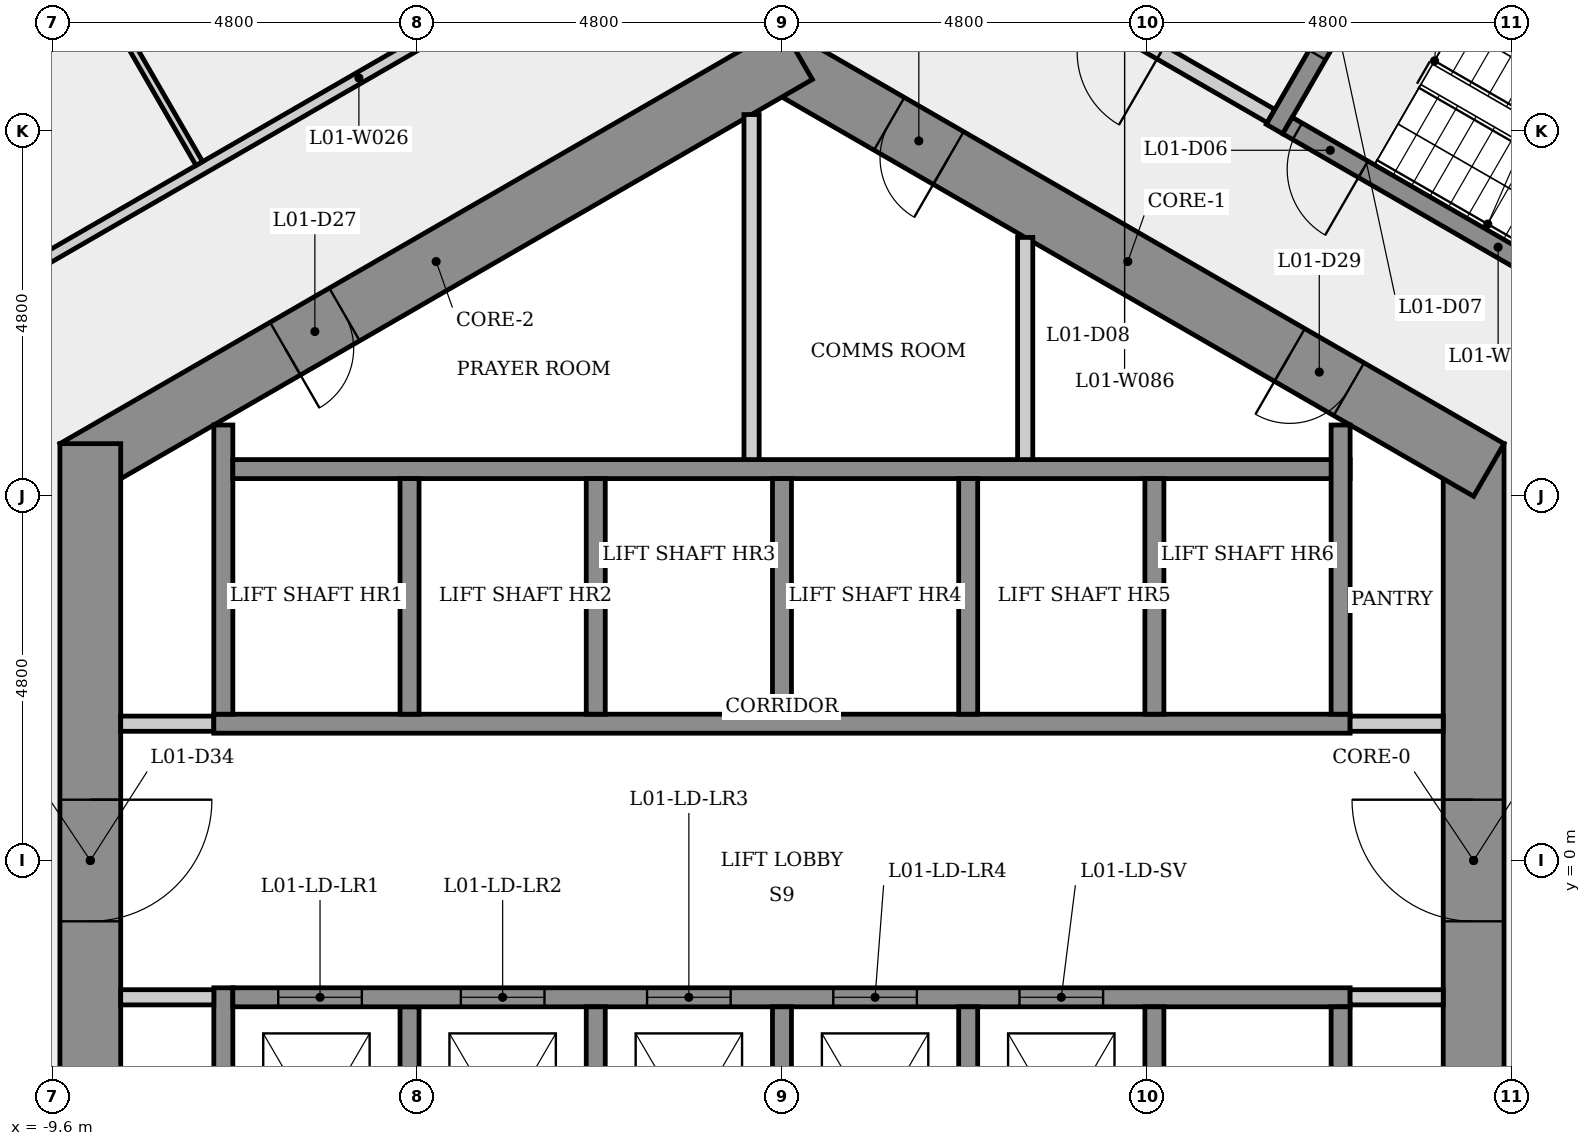
"""IFC4 building model, lengths in metres.
Left out: names, types, materials, properties, quantities, classifications, styles, units other than length and angle.
Written with IfcOpenShell. Run it as: python <this file> out.ifc"""

import sys

from ifc_helpers import new_model, si_unit, direction, frame, frame_2d, origin, place, context, subcontext, project, spatial, rectangle, extrude, element, fill, save


model = new_model("IFC4")
c1 = context("Model", 3, precision=1e-05, world=origin(), true_north=direction((0.0, 1.0)))
c2 = subcontext(c1, "Body", "Model", "MODEL_VIEW")
j1 = project(units=[si_unit("LENGTHUNIT", "METRE"), si_unit("PLANEANGLEUNIT", "RADIAN")], contexts=[c1])
p1 = place(None, origin())
s1 = spatial("IfcSite", under=j1, at=p1, CompositionType="ELEMENT")
p2 = place(p1, origin())
s2 = spatial("IfcBuilding", under=s1, at=p2, CompositionType="ELEMENT")
p3 = place(p2, frame((0.0, 0.0, 7.0)))
s3 = spatial("IfcBuildingStorey", under=s2, at=p3, CompositionType="ELEMENT", Elevation=7.0)
p4 = place(p3, frame((9.1, -5.485, 0.0), z_axis=(0.0, 0.0, 1.0), x_axis=(0.0, 1.0, 0.0)))
e1 = element("IfcWall", 1, at=p4, inside=s3, PredefinedType="SHEAR", context=c2, shape_type="SweptSolid", body=[
    extrude(rectangle(XDim=10.97, YDim=0.8, at=frame_2d((5.485, 0.0))), origin(), (0.0, 0.0, 1.0), 4.5),
])
p5 = place(p4, frame((4.685, 0.0, 0.0)))
e2 = element("IfcOpeningElement", 2, at=p5, cuts=e1, PredefinedType="OPENING", context=c2, shape_type="SweptSolid", body=[
    extrude(rectangle(XDim=1.6, YDim=2.1, at=frame_2d((0.8, 1.05))), frame((0.0, 0.41, 0.0), z_axis=(0.0, -1.0, 0.0), x_axis=(1.0, 0.0, 0.0)), (0.0, 0.0, 1.0), 0.82),
])
p6 = place(p3, frame((9.3, 5.138, 0.0), z_axis=(0.0, 0.0, 1.0), x_axis=(-0.866023993627, 0.500002442456, 0.0)))
e3 = element("IfcWall", 3, at=p6, inside=s3, PredefinedType="SHEAR", context=c2, shape_type="SweptSolid", body=[
    extrude(rectangle(XDim=10.97, YDim=0.8, at=frame_2d((5.485, 0.0))), origin(), (0.0, 0.0, 1.0), 4.5),
])
p7 = place(p6, frame((8.21, 0.0, 0.0)))
e4 = element("IfcOpeningElement", 4, at=p7, cuts=e3, PredefinedType="OPENING", context=c2, shape_type="SweptSolid", body=[
    extrude(rectangle(XDim=0.9, YDim=2.1, at=frame_2d((0.45, 1.05))), frame((0.0, 0.41, 0.0), z_axis=(0.0, -1.0, 0.0), x_axis=(1.0, 0.0, 0.0)), (0.0, 0.0, 1.0), 0.82),
])
p8 = place(p6, frame((2.126, 0.0, 0.0)))
e5 = element("IfcOpeningElement", 5, at=p8, cuts=e3, PredefinedType="OPENING", context=c2, shape_type="SweptSolid", body=[
    extrude(rectangle(XDim=0.9, YDim=2.1, at=frame_2d((0.45, 1.05))), frame((0.0, 0.41, 0.0), z_axis=(0.0, -1.0, 0.0), x_axis=(1.0, 0.0, 0.0)), (0.0, 0.0, 1.0), 0.82),
])
p9 = place(p3, frame((0.2, 10.623, 0.0), z_axis=(0.0, 0.0, 1.0), x_axis=(-0.866023993627, -0.500002442456, 0.0)))
e6 = element("IfcWall", 6, at=p9, inside=s3, PredefinedType="SHEAR", context=c2, shape_type="SweptSolid", body=[
    extrude(rectangle(XDim=10.97, YDim=0.8, at=frame_2d((5.485, 0.0))), origin(), (0.0, 0.0, 1.0), 4.5),
])
p10 = place(p9, frame((6.877, 0.0, 0.0)))
e7 = element("IfcOpeningElement", 7, at=p10, cuts=e6, PredefinedType="OPENING", context=c2, shape_type="SweptSolid", body=[
    extrude(rectangle(XDim=0.9, YDim=2.1, at=frame_2d((0.45, 1.05))), frame((0.0, 0.41, 0.0), z_axis=(0.0, -1.0, 0.0), x_axis=(1.0, 0.0, 0.0)), (0.0, 0.0, 1.0), 0.82),
])
p11 = place(p3, frame((-9.1, 5.485, 0.0), z_axis=(0.0, 0.0, 1.0), x_axis=(0.0, -1.0, 0.0)))
e8 = element("IfcWall", 8, at=p11, inside=s3, PredefinedType="SHEAR", context=c2, shape_type="SweptSolid", body=[
    extrude(rectangle(XDim=10.97, YDim=0.8, at=frame_2d((5.485, 0.0))), origin(), (0.0, 0.0, 1.0), 4.5),
])
p12 = place(p11, frame((4.685, 0.0, 0.0)))
e9 = element("IfcOpeningElement", 9, at=p12, cuts=e8, PredefinedType="OPENING", context=c2, shape_type="SweptSolid", body=[
    extrude(rectangle(XDim=1.6, YDim=2.1, at=frame_2d((0.8, 1.05))), frame((0.0, 0.41, 0.0), z_axis=(0.0, -1.0, 0.0), x_axis=(1.0, 0.0, 0.0)), (0.0, 0.0, 1.0), 0.82),
])
p13 = place(p3, frame((-10.598, 7.391, 0.0), z_axis=(0.0, 0.0, 1.0), x_axis=(0.866022183431, 0.500005577774, 0.0)))
e10 = element("IfcWall", 10, at=p13, inside=s3, PredefinedType="PARTITIONING", context=c2, shape_type="SweptSolid", body=[
    extrude(rectangle(XDim=11.619, YDim=0.15, at=frame_2d((5.81, 0.0))), origin(), (0.0, 0.0, 1.0), 4.1),
])
p14 = place(p13, frame((7.001, 0.0, 0.0)))
e11 = element("IfcOpeningElement", 11, at=p14, cuts=e10, PredefinedType="OPENING", context=c2, shape_type="SweptSolid", body=[
    extrude(rectangle(XDim=1.0, YDim=2.1, at=frame_2d((0.5, 1.05))), frame((0.0, 0.085, 0.0), z_axis=(0.0, -1.0, 0.0), x_axis=(1.0, 0.0, 0.0)), (0.0, 0.0, 1.0), 0.17),
])
p15 = place(p3, frame((-8.7, 1.8, 0.0), z_axis=(0.0, 0.0, 1.0), x_axis=(1.0, 0.0, 0.0)))
e12 = element("IfcWall", 12, at=p15, inside=s3, PredefinedType="PARTITIONING", context=c2, shape_type="SweptSolid", body=[
    extrude(rectangle(XDim=1.225, YDim=0.2, at=frame_2d((0.613, 0.0))), origin(), (0.0, 0.0, 1.0), 4.1),
])
p16 = place(p3, frame((-7.666, 9.171, 0.0), z_axis=(0.0, 0.0, 1.0), x_axis=(-0.500009404554, 0.866019973994, 0.0)))
e13 = element("IfcWall", 13, at=p16, inside=s3, PredefinedType="PARTITIONING", context=c2, shape_type="SweptSolid", body=[
    extrude(rectangle(XDim=9.01, YDim=0.1, at=frame_2d((4.505, 0.0))), origin(), (0.0, 0.0, 1.0), 4.1),
])
p17 = place(p3, frame((-7.475, 1.8, 0.0), z_axis=(0.0, 0.0, 1.0), x_axis=(1.0, 0.0, 0.0)))
e14 = element("IfcWall", 14, at=p17, inside=s3, PredefinedType="SHEAR", context=c2, shape_type="SweptSolid", body=[
    extrude(rectangle(XDim=14.95, YDim=0.25, at=frame_2d((7.475, 0.0))), origin(), (0.0, 0.0, 1.0), 4.1),
])
p18 = place(p3, frame((-7.35, -5.73, 0.0), z_axis=(0.0, 0.0, 1.0), x_axis=(0.0, 1.0, 0.0)))
e15 = element("IfcWall", 15, at=p18, inside=s3, PredefinedType="SHEAR", context=c2, shape_type="SweptSolid", body=[
    extrude(rectangle(XDim=4.055, YDim=0.25, at=frame_2d((2.028, 0.0))), origin(), (0.0, 0.0, 1.0), 4.1),
])
p19 = place(p3, frame((-7.35, 1.925, 0.0), z_axis=(0.0, 0.0, 1.0), x_axis=(0.0, 1.0, 0.0)))
e16 = element("IfcWall", 16, at=p19, inside=s3, PredefinedType="SHEAR", context=c2, shape_type="SweptSolid", body=[
    extrude(rectangle(XDim=3.805, YDim=0.25, at=frame_2d((1.903, 0.0))), origin(), (0.0, 0.0, 1.0), 4.1),
])
p20 = place(p3, frame((-7.225, 5.15, 0.0), z_axis=(0.0, 0.0, 1.0), x_axis=(1.0, 0.0, 0.0)))
e17 = element("IfcWall", 17, at=p20, inside=s3, PredefinedType="SHEAR", context=c2, shape_type="SweptSolid", body=[
    extrude(rectangle(XDim=14.7, YDim=0.25, at=frame_2d((7.35, 0.0))), origin(), (0.0, 0.0, 1.0), 4.1),
])
p21 = place(p3, frame((-7.475, -1.8, 0.0), z_axis=(0.0, 0.0, 1.0), x_axis=(-1.0, 0.0, 0.0)))
e18 = element("IfcWall", 18, at=p21, inside=s3, PredefinedType="PARTITIONING", context=c2, shape_type="SweptSolid", body=[
    extrude(rectangle(XDim=1.225, YDim=0.2, at=frame_2d((0.613, 0.0))), origin(), (0.0, 0.0, 1.0), 4.1),
])
for number, where, z_axis, x_axis in (
    (19, (-4.9, -1.925, 0.0), (0.0, 0.0, 1.0), (0.0, -1.0, 0.0)),
    (20, (-4.9, 5.025, 0.0), (0.0, 0.0, 1.0), (0.0, -1.0, 0.0)),
):
    element("IfcWall", number, at=place(p3, frame(where, z_axis=z_axis, x_axis=x_axis)), inside=s3, PredefinedType="SHEAR", context=c2, shape_type="SweptSolid", body=[
        extrude(rectangle(XDim=3.1, YDim=0.25, at=frame_2d((1.55, 0.0))), origin(), (0.0, 0.0, 1.0), 4.5),
    ])
p22 = place(p3, frame((-7.225, -1.8, 0.0), z_axis=(0.0, 0.0, 1.0), x_axis=(1.0, 0.0, 0.0)))
e21 = element("IfcWall", 21, at=p22, inside=s3, PredefinedType="SHEAR", context=c2, shape_type="SweptSolid", body=[
    extrude(rectangle(XDim=14.7, YDim=0.25, at=frame_2d((7.35, 0.0))), origin(), (0.0, 0.0, 1.0), 4.1),
])
p23 = place(p22, frame((0.597, 0.0, 0.0)))
e22 = element("IfcOpeningElement", 22, at=p23, cuts=e21, PredefinedType="OPENING", context=c2, shape_type="SweptSolid", body=[
    extrude(rectangle(XDim=1.1, YDim=2.1, at=frame_2d((0.55, 1.05))), frame((0.0, 0.135, 0.0), z_axis=(0.0, -1.0, 0.0), x_axis=(1.0, 0.0, 0.0)), (0.0, 0.0, 1.0), 0.27),
])
p24 = place(p22, frame((3.0, 0.0, 0.0)))
e23 = element("IfcOpeningElement", 23, at=p24, cuts=e21, PredefinedType="OPENING", context=c2, shape_type="SweptSolid", body=[
    extrude(rectangle(XDim=1.1, YDim=2.1, at=frame_2d((0.55, 1.05))), frame((0.0, 0.135, 0.0), z_axis=(0.0, -1.0, 0.0), x_axis=(1.0, 0.0, 0.0)), (0.0, 0.0, 1.0), 0.27),
])
p25 = place(p22, frame((5.45, 0.0, 0.0)))
e24 = element("IfcOpeningElement", 24, at=p25, cuts=e21, PredefinedType="OPENING", context=c2, shape_type="SweptSolid", body=[
    extrude(rectangle(XDim=1.1, YDim=2.1, at=frame_2d((0.55, 1.05))), frame((0.0, 0.135, 0.0), z_axis=(0.0, -1.0, 0.0), x_axis=(1.0, 0.0, 0.0)), (0.0, 0.0, 1.0), 0.27),
])
p26 = place(p22, frame((7.9, 0.0, 0.0)))
e25 = element("IfcOpeningElement", 25, at=p26, cuts=e21, PredefinedType="OPENING", context=c2, shape_type="SweptSolid", body=[
    extrude(rectangle(XDim=1.1, YDim=2.1, at=frame_2d((0.55, 1.05))), frame((0.0, 0.135, 0.0), z_axis=(0.0, -1.0, 0.0), x_axis=(1.0, 0.0, 0.0)), (0.0, 0.0, 1.0), 0.27),
])
p27 = place(p22, frame((10.35, 0.0, 0.0)))
e26 = element("IfcOpeningElement", 26, at=p27, cuts=e21, PredefinedType="OPENING", context=c2, shape_type="SweptSolid", body=[
    extrude(rectangle(XDim=1.1, YDim=2.1, at=frame_2d((0.55, 1.05))), frame((0.0, 0.135, 0.0), z_axis=(0.0, -1.0, 0.0), x_axis=(1.0, 0.0, 0.0)), (0.0, 0.0, 1.0), 0.27),
])
for number, where, z_axis, x_axis in (
    (27, (-2.45, -1.925, 0.0), (0.0, 0.0, 1.0), (0.0, -1.0, 0.0)),
    (28, (-2.45, 5.025, 0.0), (0.0, 0.0, 1.0), (0.0, -1.0, 0.0)),
):
    element("IfcWall", number, at=place(p3, frame(where, z_axis=z_axis, x_axis=x_axis)), inside=s3, PredefinedType="SHEAR", context=c2, shape_type="SweptSolid", body=[
        extrude(rectangle(XDim=3.1, YDim=0.25, at=frame_2d((1.55, 0.0))), origin(), (0.0, 0.0, 1.0), 4.5),
    ])
p28 = place(p3, frame((-0.4, 9.815, 0.0), z_axis=(0.0, 0.0, 1.0), x_axis=(0.0, -1.0, 0.0)))
e29 = element("IfcWall", 29, at=p28, inside=s3, PredefinedType="PARTITIONING", context=c2, shape_type="SweptSolid", body=[
    extrude(rectangle(XDim=4.54, YDim=0.2, at=frame_2d((2.27, 0.0))), origin(), (0.0, 0.0, 1.0), 4.1),
])
for number, where, z_axis, x_axis in (
    (30, (0.0, -1.925, 0.0), (0.0, 0.0, 1.0), (0.0, -1.0, 0.0)),
    (31, (0.0, 5.025, 0.0), (0.0, 0.0, 1.0), (0.0, -1.0, 0.0)),
    (32, (2.45, -1.925, 0.0), (0.0, 0.0, 1.0), (0.0, -1.0, 0.0)),
    (33, (2.45, 5.025, 0.0), (0.0, 0.0, 1.0), (0.0, -1.0, 0.0)),
):
    element("IfcWall", number, at=place(p3, frame(where, z_axis=z_axis, x_axis=x_axis)), inside=s3, PredefinedType="SHEAR", context=c2, shape_type="SweptSolid", body=[
        extrude(rectangle(XDim=3.1, YDim=0.25, at=frame_2d((1.55, 0.0))), origin(), (0.0, 0.0, 1.0), 4.5),
    ])
p29 = place(p3, frame((3.2, 8.198, 0.0), z_axis=(0.0, 0.0, 1.0), x_axis=(0.0, -1.0, 0.0)))
e34 = element("IfcWall", 34, at=p29, inside=s3, PredefinedType="PARTITIONING", context=c2, shape_type="SweptSolid", body=[
    extrude(rectangle(XDim=2.924, YDim=0.2, at=frame_2d((1.462, 0.0))), origin(), (0.0, 0.0, 1.0), 4.1),
])
for number, where, z_axis, x_axis in (
    (35, (4.9, -1.925, 0.0), (0.0, 0.0, 1.0), (0.0, -1.0, 0.0)),
    (36, (4.9, 5.025, 0.0), (0.0, 0.0, 1.0), (0.0, -1.0, 0.0)),
):
    element("IfcWall", number, at=place(p3, frame(where, z_axis=z_axis, x_axis=x_axis)), inside=s3, PredefinedType="SHEAR", context=c2, shape_type="SweptSolid", body=[
        extrude(rectangle(XDim=3.1, YDim=0.25, at=frame_2d((1.55, 0.0))), origin(), (0.0, 0.0, 1.0), 4.5),
    ])
p30 = place(p3, frame((6.435, 9.795, 0.0), z_axis=(0.0, 0.0, 1.0), x_axis=(-0.866012907634, 0.500021643343, 0.0)))
e37 = element("IfcWall", 37, at=p30, inside=s3, PredefinedType="PARTITIONING", context=c2, shape_type="SweptSolid", body=[
    extrude(rectangle(XDim=4.45, YDim=0.2, at=frame_2d((2.225, 0.0))), origin(), (0.0, 0.0, 1.0), 4.1),
])
p31 = place(p30, frame((1.675, 0.0, 0.0)))
e38 = element("IfcOpeningElement", 38, at=p31, cuts=e37, PredefinedType="OPENING", context=c2, shape_type="SweptSolid", body=[
    extrude(rectangle(XDim=1.1, YDim=2.1, at=frame_2d((0.55, 1.05))), frame((0.0, 0.11, 0.0), z_axis=(0.0, -1.0, 0.0), x_axis=(1.0, 0.0, 0.0)), (0.0, 0.0, 1.0), 0.22),
])
p32 = place(p3, frame((6.48, 9.624, 0.0), z_axis=(0.0, 0.0, 1.0), x_axis=(0.500017246033, 0.866015446554, 0.0)))
e39 = element("IfcWall", 39, at=p32, inside=s3, PredefinedType="SHEAR", context=c2, shape_type="SweptSolid", body=[
    extrude(rectangle(XDim=3.25, YDim=0.25, at=frame_2d((1.625, 0.0))), origin(), (0.0, 0.0, 1.0), 4.1),
])
p33 = place(p32, frame((1.125, 0.0, 0.0)))
e40 = element("IfcOpeningElement", 40, at=p33, cuts=e39, PredefinedType="OPENING", context=c2, shape_type="SweptSolid", body=[
    extrude(rectangle(XDim=1.0, YDim=2.1, at=frame_2d((0.5, 1.05))), frame((0.0, 0.135, 0.0), z_axis=(0.0, -1.0, 0.0), x_axis=(1.0, 0.0, 0.0)), (0.0, 0.0, 1.0), 0.27),
])
p34 = place(p3, frame((7.475, 1.8, 0.0), z_axis=(0.0, 0.0, 1.0), x_axis=(1.0, 0.0, 0.0)))
e41 = element("IfcWall", 41, at=p34, inside=s3, PredefinedType="PARTITIONING", context=c2, shape_type="SweptSolid", body=[
    extrude(rectangle(XDim=1.225, YDim=0.2, at=frame_2d((0.613, 0.0))), origin(), (0.0, 0.0, 1.0), 4.1),
])
for number, where, z_axis, x_axis in (
    (42, (7.35, -1.925, 0.0), (0.0, 0.0, 1.0), (0.0, -1.0, 0.0)),
    (43, (7.35, 5.73, 0.0), (0.0, 0.0, 1.0), (0.0, -1.0, 0.0)),
):
    element("IfcWall", number, at=place(p3, frame(where, z_axis=z_axis, x_axis=x_axis)), inside=s3, PredefinedType="SHEAR", context=c2, shape_type="SweptSolid", body=[
        extrude(rectangle(XDim=3.805, YDim=0.25, at=frame_2d((1.903, 0.0))), origin(), (0.0, 0.0, 1.0), 4.1),
    ])
p35 = place(p3, frame((8.151, 12.268, 0.0), z_axis=(0.0, 0.0, 1.0), x_axis=(0.866025499775, -0.499999833739, 0.0)))
e44 = element("IfcWall", 44, at=p35, inside=s3, PredefinedType="SHEAR", context=c2, shape_type="SweptSolid", body=[
    extrude(rectangle(XDim=6.4, YDim=0.25, at=frame_2d((3.2, 0.0))), origin(), (0.0, 0.0, 1.0), 4.1),
])
p36 = place(p3, frame((8.7, -1.8, 0.0), z_axis=(0.0, 0.0, 1.0), x_axis=(-1.0, 0.0, 0.0)))
e45 = element("IfcWall", 45, at=p36, inside=s3, PredefinedType="PARTITIONING", context=c2, shape_type="SweptSolid", body=[
    extrude(rectangle(XDim=1.225, YDim=0.2, at=frame_2d((0.613, 0.0))), origin(), (0.0, 0.0, 1.0), 4.1),
])
p37 = place(p3, frame((12.194, 6.47, 0.0), z_axis=(0.0, 0.0, 1.0), x_axis=(-0.866025499775, 0.499999833739, 0.0)))
e46 = element("IfcWall", 46, at=p37, inside=s3, PredefinedType="SHEAR", context=c2, shape_type="SweptSolid", body=[
    extrude(rectangle(XDim=6.4, YDim=0.25, at=frame_2d((3.2, 0.0))), origin(), (0.0, 0.0, 1.0), 4.1),
])
p38 = place(p37, frame((5.25, 0.0, 0.0)))
e47 = element("IfcOpeningElement", 47, at=p38, cuts=e46, PredefinedType="OPENING", context=c2, shape_type="SweptSolid", body=[
    extrude(rectangle(XDim=1.0, YDim=2.1, at=frame_2d((0.5, 1.05))), frame((0.0, 0.135, 0.0), z_axis=(0.0, -1.0, 0.0), x_axis=(1.0, 0.0, 0.0)), (0.0, 0.0, 1.0), 0.27),
])
p39 = place(p23, origin())
e48 = element("IfcDoor", 48, at=p39, inside=s3, OperationType="SLIDING_TO_LEFT", PredefinedType="DOOR", context=c2, shape_type="SweptSolid", body=[
    extrude(rectangle(XDim=1.1, YDim=2.1, at=frame_2d((0.55, 1.05))), frame((0.0, 0.025, 0.0), z_axis=(0.0, -1.0, 0.0), x_axis=(1.0, 0.0, 0.0)), (0.0, 0.0, 1.0), 0.05),
])
fill(e22, e48)
p40 = place(p24, origin())
e49 = element("IfcDoor", 49, at=p40, inside=s3, OperationType="SLIDING_TO_LEFT", PredefinedType="DOOR", context=c2, shape_type="SweptSolid", body=[
    extrude(rectangle(XDim=1.1, YDim=2.1, at=frame_2d((0.55, 1.05))), frame((0.0, 0.025, 0.0), z_axis=(0.0, -1.0, 0.0), x_axis=(1.0, 0.0, 0.0)), (0.0, 0.0, 1.0), 0.05),
])
fill(e23, e49)
p41 = place(p25, origin())
e50 = element("IfcDoor", 50, at=p41, inside=s3, OperationType="SLIDING_TO_LEFT", PredefinedType="DOOR", context=c2, shape_type="SweptSolid", body=[
    extrude(rectangle(XDim=1.1, YDim=2.1, at=frame_2d((0.55, 1.05))), frame((0.0, 0.025, 0.0), z_axis=(0.0, -1.0, 0.0), x_axis=(1.0, 0.0, 0.0)), (0.0, 0.0, 1.0), 0.05),
])
fill(e24, e50)
p42 = place(p26, origin())
e51 = element("IfcDoor", 51, at=p42, inside=s3, OperationType="SLIDING_TO_LEFT", PredefinedType="DOOR", context=c2, shape_type="SweptSolid", body=[
    extrude(rectangle(XDim=1.1, YDim=2.1, at=frame_2d((0.55, 1.05))), frame((0.0, 0.025, 0.0), z_axis=(0.0, -1.0, 0.0), x_axis=(1.0, 0.0, 0.0)), (0.0, 0.0, 1.0), 0.05),
])
fill(e25, e51)
p43 = place(p27, origin())
e52 = element("IfcDoor", 52, at=p43, inside=s3, OperationType="SLIDING_TO_LEFT", PredefinedType="DOOR", context=c2, shape_type="SweptSolid", body=[
    extrude(rectangle(XDim=1.1, YDim=2.1, at=frame_2d((0.55, 1.05))), frame((0.0, 0.025, 0.0), z_axis=(0.0, -1.0, 0.0), x_axis=(1.0, 0.0, 0.0)), (0.0, 0.0, 1.0), 0.05),
])
fill(e26, e52)
p44 = place(p38, origin())
e53 = element("IfcDoor", 53, at=p44, inside=s3, OperationType="SINGLE_SWING_LEFT", PredefinedType="DOOR", context=c2, shape_type="SweptSolid", body=[
    extrude(rectangle(XDim=1.0, YDim=2.1, at=frame_2d((0.5, 1.05))), frame((0.0, 0.025, 0.0), z_axis=(0.0, -1.0, 0.0), x_axis=(1.0, 0.0, 0.0)), (0.0, 0.0, 1.0), 0.05),
])
fill(e47, e53)
p45 = place(p33, origin())
e54 = element("IfcDoor", 54, at=p45, inside=s3, OperationType="SINGLE_SWING_RIGHT", PredefinedType="DOOR", context=c2, shape_type="SweptSolid", body=[
    extrude(rectangle(XDim=1.0, YDim=2.1, at=frame_2d((0.5, 1.05))), frame((0.0, 0.025, 0.0), z_axis=(0.0, -1.0, 0.0), x_axis=(1.0, 0.0, 0.0)), (0.0, 0.0, 1.0), 0.05),
])
fill(e40, e54)
p46 = place(p31, origin())
e55 = element("IfcDoor", 55, at=p46, inside=s3, OperationType="SINGLE_SWING_LEFT", PredefinedType="DOOR", context=c2, shape_type="SweptSolid", body=[
    extrude(rectangle(XDim=1.1, YDim=2.1, at=frame_2d((0.55, 1.05))), frame((0.0, 0.025, 0.0), z_axis=(0.0, -1.0, 0.0), x_axis=(1.0, 0.0, 0.0)), (0.0, 0.0, 1.0), 0.05),
])
fill(e38, e55)
p47 = place(p10, origin())
e56 = element("IfcDoor", 56, at=p47, inside=s3, OperationType="SINGLE_SWING_RIGHT", PredefinedType="DOOR", context=c2, shape_type="SweptSolid", body=[
    extrude(rectangle(XDim=0.9, YDim=2.1, at=frame_2d((0.45, 1.05))), frame((0.0, 0.025, 0.0), z_axis=(0.0, -1.0, 0.0), x_axis=(1.0, 0.0, 0.0)), (0.0, 0.0, 1.0), 0.05),
])
fill(e7, e56)
p48 = place(p7, origin())
e57 = element("IfcDoor", 57, at=p48, inside=s3, OperationType="SINGLE_SWING_LEFT", PredefinedType="DOOR", context=c2, shape_type="SweptSolid", body=[
    extrude(rectangle(XDim=0.9, YDim=2.1, at=frame_2d((0.45, 1.05))), frame((0.0, 0.025, 0.0), z_axis=(0.0, -1.0, 0.0), x_axis=(1.0, 0.0, 0.0)), (0.0, 0.0, 1.0), 0.05),
])
fill(e4, e57)
p49 = place(p8, origin())
e58 = element("IfcDoor", 58, at=p49, inside=s3, OperationType="SINGLE_SWING_RIGHT", PredefinedType="DOOR", context=c2, shape_type="SweptSolid", body=[
    extrude(rectangle(XDim=0.9, YDim=2.1, at=frame_2d((0.45, 1.05))), frame((0.0, 0.025, 0.0), z_axis=(0.0, -1.0, 0.0), x_axis=(1.0, 0.0, 0.0)), (0.0, 0.0, 1.0), 0.05),
])
fill(e5, e58)
p50 = place(p5, origin())
e59 = element("IfcDoor", 59, at=p50, inside=s3, OperationType="SINGLE_SWING_RIGHT", PredefinedType="DOOR", context=c2, shape_type="SweptSolid", body=[
    extrude(rectangle(XDim=1.6, YDim=2.1, at=frame_2d((0.8, 1.05))), frame((0.0, 0.025, 0.0), z_axis=(0.0, -1.0, 0.0), x_axis=(1.0, 0.0, 0.0)), (0.0, 0.0, 1.0), 0.05),
])
fill(e2, e59)
p51 = place(p12, origin())
e60 = element("IfcDoor", 60, at=p51, inside=s3, OperationType="SINGLE_SWING_LEFT", PredefinedType="DOOR", context=c2, shape_type="SweptSolid", body=[
    extrude(rectangle(XDim=1.6, YDim=2.1, at=frame_2d((0.8, 1.05))), frame((0.0, 0.025, 0.0), z_axis=(0.0, -1.0, 0.0), x_axis=(1.0, 0.0, 0.0)), (0.0, 0.0, 1.0), 0.05),
])
fill(e9, e60)
save(model, sys.argv[1])
